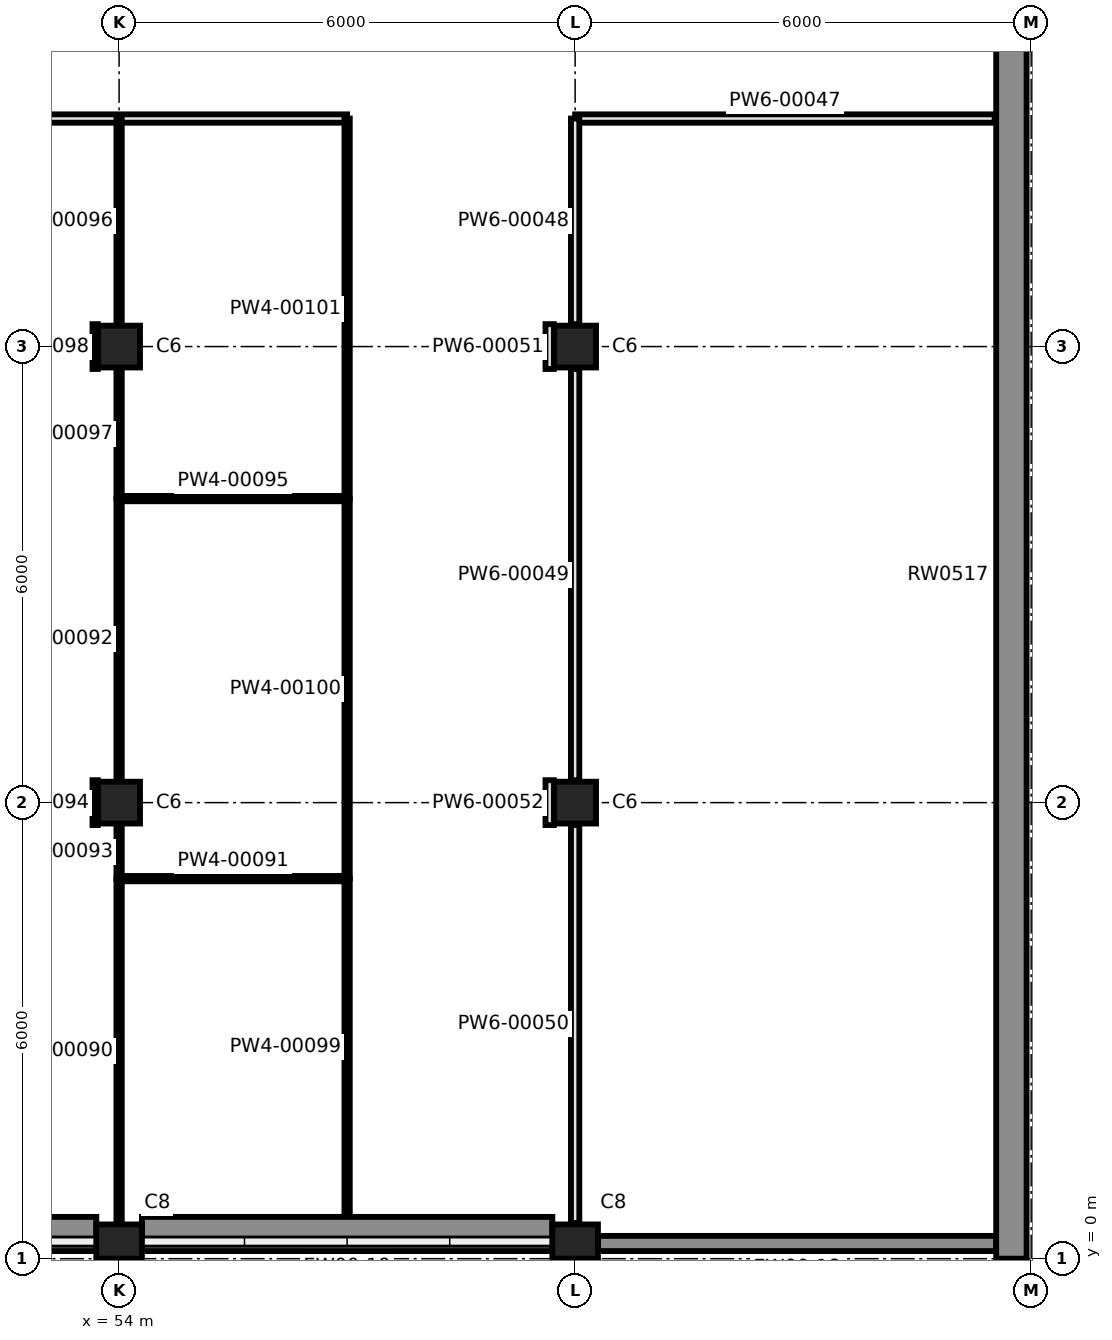
"""IFC4 building model, lengths in metres.
Left out: names, types, materials, properties, quantities, classifications, styles, units other than length and angle.
Written with IfcOpenShell. Run it as: python <this file> out.ifc"""

import sys

from ifc_helpers import new_model, si_unit, direction, frame, frame_2d, origin, origin_2d, place, context, subcontext, project, spatial, rectangle, extrude, element, fill, save


model = new_model("IFC4")
c1 = context("Model", 3, precision=1e-05, world=origin(), true_north=direction((0.0, 1.0)))
c2 = subcontext(c1, "Body", "Model", "MODEL_VIEW")
j1 = project(units=[si_unit("LENGTHUNIT", "METRE"), si_unit("PLANEANGLEUNIT", "RADIAN")], contexts=[c1])
p1 = place(None, origin())
s1 = spatial("IfcSite", under=j1, at=p1, CompositionType="ELEMENT")
p2 = place(p1, origin())
s2 = spatial("IfcBuilding", under=s1, at=p2, CompositionType="ELEMENT")
p3 = place(p2, origin())
s3 = spatial("IfcBuildingStorey", under=s2, at=p3, CompositionType="ELEMENT", Elevation=0.0)
for number, where, z_axis, x_axis in (
    (1, (54.0, 0.226, -0.3), (0.0, 0.0, 1.0), (1.0, 0.0, 0.0)),
    (2, (60.0, 0.226, -0.3), (0.0, 0.0, 1.0), (1.0, 0.0, 0.0)),
):
    element("IfcColumn", number, at=place(p3, frame(where, z_axis=z_axis, x_axis=x_axis)), inside=s3, PredefinedType="COLUMN", context=c2, shape_type="SweptSolid", body=[
        extrude(rectangle(XDim=0.6, YDim=0.45, at=origin_2d()), origin(), (0.0, 0.0, 1.0), 7.3),
    ])
for number, where, z_axis, x_axis in (
    (3, (54.0, 6.0, -0.3), (0.0, 0.0, 1.0), (1.0, 0.0, 0.0)),
    (4, (60.0, 6.0, -0.3), (0.0, 0.0, 1.0), (1.0, 0.0, 0.0)),
    (5, (54.0, 12.0, -0.3), (0.0, 0.0, 1.0), (1.0, 0.0, 0.0)),
    (6, (60.0, 12.0, -0.3), (0.0, 0.0, 1.0), (1.0, 0.0, 0.0)),
):
    element("IfcColumn", number, at=place(p3, frame(where, z_axis=z_axis, x_axis=x_axis)), inside=s3, PredefinedType="COLUMN", context=c2, shape_type="SweptSolid", body=[
        extrude(rectangle(XDim=0.55, YDim=0.55, at=origin_2d()), origin(), (0.0, 0.0, 1.0), 7.3),
    ])
p4 = place(p3, frame((65.74, 0.0, -0.3), z_axis=(0.0, 0.0, 1.0), x_axis=(0.0, 1.0, 0.0)))
e7 = element("IfcWall", 7, at=p4, inside=s3, PredefinedType="SOLIDWALL", context=c2, shape_type="SweptSolid", body=[
    extrude(rectangle(XDim=18.0, YDim=0.4, at=frame_2d((9.0, 0.0))), origin(), (0.0, 0.0, 1.0), 7.3),
])
p5 = place(p3, frame((65.54, 0.2, 0.0), z_axis=(0.0, 0.0, 1.0), x_axis=(-1.0, 0.0, 0.0)))
e8 = element("IfcWall", 8, at=p5, inside=s3, PredefinedType="SOLIDWALL", context=c2, shape_type="SweptSolid", body=[
    extrude(rectangle(XDim=5.24, YDim=0.2, at=frame_2d((2.62, 0.0))), origin(), (0.0, 0.0, 1.0), 6.75),
])
p6 = place(p5, frame((2.02, 0.0, 0.0)))
e9 = element("IfcOpeningElement", 9, at=p6, cuts=e8, PredefinedType="OPENING", context=c2, shape_type="SweptSolid", body=[
    extrude(rectangle(XDim=1.1, YDim=2.4, at=frame_2d((0.55, 1.2))), frame((0.0, 0.11, 0.0), z_axis=(0.0, -1.0, 0.0), x_axis=(1.0, 0.0, 0.0)), (0.0, 0.0, 1.0), 0.22),
])
p7 = place(p5, frame((2.02, 0.0, 2.5)))
e10 = element("IfcOpeningElement", 10, at=p7, cuts=e8, PredefinedType="OPENING", context=c2, shape_type="SweptSolid", body=[
    extrude(rectangle(XDim=1.1, YDim=3.9, at=frame_2d((0.55, 1.95))), frame((0.0, 0.11, 0.0), z_axis=(0.0, -1.0, 0.0), x_axis=(1.0, 0.0, 0.0)), (0.0, 0.0, 1.0), 0.22),
])
p8 = place(p5, frame((0.2, 0.0, 0.1)))
e11 = element("IfcOpeningElement", 11, at=p8, cuts=e8, PredefinedType="OPENING", context=c2, shape_type="SweptSolid", body=[
    extrude(rectangle(XDim=1.82, YDim=6.3, at=frame_2d((0.91, 3.15))), frame((0.0, 0.11, 0.0), z_axis=(0.0, -1.0, 0.0), x_axis=(1.0, 0.0, 0.0)), (0.0, 0.0, 1.0), 0.22),
])
p9 = place(p5, frame((3.12, 0.0, 0.1)))
e12 = element("IfcOpeningElement", 12, at=p9, cuts=e8, PredefinedType="OPENING", context=c2, shape_type="SweptSolid", body=[
    extrude(rectangle(XDim=1.92, YDim=6.3, at=frame_2d((0.96, 3.15))), frame((0.0, 0.11, 0.0), z_axis=(0.0, -1.0, 0.0), x_axis=(1.0, 0.0, 0.0)), (0.0, 0.0, 1.0), 0.22),
])
for number, where, z_axis, x_axis in (
    (13, (59.7, 0.325, 0.0), (0.0, 0.0, 1.0), (-1.0, 0.0, 0.0)),
    (14, (53.7, 0.325, 0.0), (0.0, 0.0, 1.0), (-1.0, 0.0, 0.0)),
):
    element("IfcWall", number, at=place(p3, frame(where, z_axis=z_axis, x_axis=x_axis)), inside=s3, PredefinedType="SOLIDWALL", context=c2, shape_type="SweptSolid", body=[
        extrude(rectangle(XDim=5.4, YDim=0.45, at=frame_2d((2.7, 0.0))), origin(), (0.0, 0.0, 1.0), 4.8),
    ])
p10 = place(p3, frame((42.0, 15.0, 0.0), z_axis=(0.0, 0.0, 1.0), x_axis=(1.0, 0.0, 0.0)))
e15 = element("IfcWall", 15, at=p10, inside=s3, PredefinedType="PARTITIONING", context=c2, shape_type="SweptSolid", body=[
    extrude(rectangle(XDim=15.0, YDim=0.11, at=frame_2d((7.5, 0.0))), origin(), (0.0, 0.0, 1.0), 6.15),
])
p11 = place(p10, frame((5.25, 0.0, 0.0)))
e16 = element("IfcOpeningElement", 16, at=p11, cuts=e15, PredefinedType="OPENING", context=c2, shape_type="SweptSolid", body=[
    extrude(rectangle(XDim=1.5, YDim=2.1, at=frame_2d((0.75, 1.05))), frame((0.0, 0.065, 0.0), z_axis=(0.0, -1.0, 0.0), x_axis=(1.0, 0.0, 0.0)), (0.0, 0.0, 1.0), 0.13),
])
p12 = place(p3, frame((60.0, 15.0, 0.0), z_axis=(0.0, 0.0, 1.0), x_axis=(1.0, 0.0, 0.0)))
e17 = element("IfcWall", 17, at=p12, inside=s3, PredefinedType="PARTITIONING", context=c2, shape_type="SweptSolid", body=[
    extrude(rectangle(XDim=5.52, YDim=0.11, at=frame_2d((2.76, 0.0))), origin(), (0.0, 0.0, 1.0), 6.15),
])
p13 = place(p3, frame((60.0, 12.295, 0.0), z_axis=(0.0, 0.0, 1.0), x_axis=(0.0, 1.0, 0.0)))
e18 = element("IfcWall", 18, at=p13, inside=s3, PredefinedType="PARTITIONING", context=c2, shape_type="SweptSolid", body=[
    extrude(rectangle(XDim=2.705, YDim=0.11, at=frame_2d((1.353, 0.0))), origin(), (0.0, 0.0, 1.0), 6.15),
])
p14 = place(p3, frame((60.0, 6.295, 0.0), z_axis=(0.0, 0.0, 1.0), x_axis=(0.0, 1.0, 0.0)))
e19 = element("IfcWall", 19, at=p14, inside=s3, PredefinedType="PARTITIONING", context=c2, shape_type="SweptSolid", body=[
    extrude(rectangle(XDim=5.41, YDim=0.11, at=frame_2d((2.705, 0.0))), origin(), (0.0, 0.0, 1.0), 6.15),
])
p15 = place(p14, frame((0.655, 0.0, 0.0)))
e20 = element("IfcOpeningElement", 20, at=p15, cuts=e19, PredefinedType="OPENING", context=c2, shape_type="SweptSolid", body=[
    extrude(rectangle(XDim=1.0, YDim=2.1, at=frame_2d((0.5, 1.05))), frame((0.0, 0.065, 0.0), z_axis=(0.0, -1.0, 0.0), x_axis=(1.0, 0.0, 0.0)), (0.0, 0.0, 1.0), 0.13),
])
p16 = place(p3, frame((60.0, 0.47, 0.0), z_axis=(0.0, 0.0, 1.0), x_axis=(0.0, 1.0, 0.0)))
e21 = element("IfcWall", 21, at=p16, inside=s3, PredefinedType="PARTITIONING", context=c2, shape_type="SweptSolid", body=[
    extrude(rectangle(XDim=5.235, YDim=0.11, at=frame_2d((2.617, 0.0))), origin(), (0.0, 0.0, 1.0), 6.15),
])
for number, where, z_axis, x_axis in (
    (22, (59.665, 11.705, 0.0), (0.0, 0.0, 1.0), (0.0, 1.0, 0.0)),
    (23, (59.665, 5.705, 0.0), (0.0, 0.0, 1.0), (0.0, 1.0, 0.0)),
):
    element("IfcWall", number, at=place(p3, frame(where, z_axis=z_axis, x_axis=x_axis)), inside=s3, PredefinedType="PARTITIONING", context=c2, shape_type="SweptSolid", body=[
        extrude(rectangle(XDim=0.59, YDim=0.11, at=frame_2d((0.295, 0.0))), origin(), (0.0, 0.0, 1.0), 6.15),
    ])
p17 = place(p3, frame((54.0, 0.47, 0.0), z_axis=(0.0, 0.0, 1.0), x_axis=(0.0, 1.0, 0.0)))
e24 = element("IfcWall", 24, at=p17, inside=s3, PredefinedType="PARTITIONING", context=c2, shape_type="SweptSolid", body=[
    extrude(rectangle(XDim=4.53, YDim=0.07, at=frame_2d((2.265, 0.0))), origin(), (0.0, 0.0, 1.0), 6.15),
])
p18 = place(p3, frame((54.0, 5.0, 0.0), z_axis=(0.0, 0.0, 1.0), x_axis=(1.0, 0.0, 0.0)))
e25 = element("IfcWall", 25, at=p18, inside=s3, PredefinedType="PARTITIONING", context=c2, shape_type="SweptSolid", body=[
    extrude(rectangle(XDim=3.0, YDim=0.07, at=frame_2d((1.5, 0.0))), origin(), (0.0, 0.0, 1.0), 6.15),
])
p19 = place(p3, frame((54.0, 6.295, 0.0), z_axis=(0.0, 0.0, 1.0), x_axis=(0.0, 1.0, 0.0)))
e26 = element("IfcWall", 26, at=p19, inside=s3, PredefinedType="PARTITIONING", context=c2, shape_type="SweptSolid", body=[
    extrude(rectangle(XDim=3.705, YDim=0.07, at=frame_2d((1.853, 0.0))), origin(), (0.0, 0.0, 1.0), 6.15),
])
p20 = place(p3, frame((54.0, 5.0, 0.0), z_axis=(0.0, 0.0, 1.0), x_axis=(0.0, 1.0, 0.0)))
e27 = element("IfcWall", 27, at=p20, inside=s3, PredefinedType="PARTITIONING", context=c2, shape_type="SweptSolid", body=[
    extrude(rectangle(XDim=0.705, YDim=0.07, at=frame_2d((0.353, 0.0))), origin(), (0.0, 0.0, 1.0), 6.15),
])
p21 = place(p3, frame((53.685, 5.705, 0.0), z_axis=(0.0, 0.0, 1.0), x_axis=(0.0, 1.0, 0.0)))
e28 = element("IfcWall", 28, at=p21, inside=s3, PredefinedType="PARTITIONING", context=c2, shape_type="SweptSolid", body=[
    extrude(rectangle(XDim=0.59, YDim=0.07, at=frame_2d((0.295, 0.0))), origin(), (0.0, 0.0, 1.0), 6.15),
])
p22 = place(p3, frame((54.0, 10.0, 0.0), z_axis=(0.0, 0.0, 1.0), x_axis=(1.0, 0.0, 0.0)))
e29 = element("IfcWall", 29, at=p22, inside=s3, PredefinedType="PARTITIONING", context=c2, shape_type="SweptSolid", body=[
    extrude(rectangle(XDim=3.0, YDim=0.07, at=frame_2d((1.5, 0.0))), origin(), (0.0, 0.0, 1.0), 6.15),
])
p23 = place(p3, frame((54.0, 12.295, 0.0), z_axis=(0.0, 0.0, 1.0), x_axis=(0.0, 1.0, 0.0)))
e30 = element("IfcWall", 30, at=p23, inside=s3, PredefinedType="PARTITIONING", context=c2, shape_type="SweptSolid", body=[
    extrude(rectangle(XDim=2.705, YDim=0.07, at=frame_2d((1.353, 0.0))), origin(), (0.0, 0.0, 1.0), 6.15),
])
p24 = place(p3, frame((54.0, 10.0, 0.0), z_axis=(0.0, 0.0, 1.0), x_axis=(0.0, 1.0, 0.0)))
e31 = element("IfcWall", 31, at=p24, inside=s3, PredefinedType="PARTITIONING", context=c2, shape_type="SweptSolid", body=[
    extrude(rectangle(XDim=1.705, YDim=0.07, at=frame_2d((0.853, 0.0))), origin(), (0.0, 0.0, 1.0), 6.15),
])
p25 = place(p3, frame((53.685, 11.705, 0.0), z_axis=(0.0, 0.0, 1.0), x_axis=(0.0, 1.0, 0.0)))
e32 = element("IfcWall", 32, at=p25, inside=s3, PredefinedType="PARTITIONING", context=c2, shape_type="SweptSolid", body=[
    extrude(rectangle(XDim=0.59, YDim=0.07, at=frame_2d((0.295, 0.0))), origin(), (0.0, 0.0, 1.0), 6.15),
])
p26 = place(p3, frame((57.0, 0.57, 0.0), z_axis=(0.0, 0.0, 1.0), x_axis=(0.0, 1.0, 0.0)))
e33 = element("IfcWall", 33, at=p26, inside=s3, PredefinedType="PARTITIONING", context=c2, shape_type="SweptSolid", body=[
    extrude(rectangle(XDim=4.43, YDim=0.07, at=frame_2d((2.215, 0.0))), origin(), (0.0, 0.0, 1.0), 6.3),
])
p27 = place(p26, frame((1.48, 0.0, 0.0)))
e34 = element("IfcOpeningElement", 34, at=p27, cuts=e33, PredefinedType="OPENING", context=c2, shape_type="SweptSolid", body=[
    extrude(rectangle(XDim=0.92, YDim=2.04, at=frame_2d((0.46, 1.02))), frame((0.0, 0.045, 0.0), z_axis=(0.0, -1.0, 0.0), x_axis=(1.0, 0.0, 0.0)), (0.0, 0.0, 1.0), 0.09),
])
p28 = place(p3, frame((57.0, 5.0, 0.0), z_axis=(0.0, 0.0, 1.0), x_axis=(0.0, 1.0, 0.0)))
e35 = element("IfcWall", 35, at=p28, inside=s3, PredefinedType="PARTITIONING", context=c2, shape_type="SweptSolid", body=[
    extrude(rectangle(XDim=5.0, YDim=0.07, at=frame_2d((2.5, 0.0))), origin(), (0.0, 0.0, 1.0), 6.15),
])
p29 = place(p28, frame((2.05, 0.0, 0.0)))
e36 = element("IfcOpeningElement", 36, at=p29, cuts=e35, PredefinedType="OPENING", context=c2, shape_type="SweptSolid", body=[
    extrude(rectangle(XDim=0.92, YDim=2.04, at=frame_2d((0.46, 1.02))), frame((0.0, 0.045, 0.0), z_axis=(0.0, -1.0, 0.0), x_axis=(1.0, 0.0, 0.0)), (0.0, 0.0, 1.0), 0.09),
])
p30 = place(p3, frame((57.0, 10.0, 0.0), z_axis=(0.0, 0.0, 1.0), x_axis=(0.0, 1.0, 0.0)))
e37 = element("IfcWall", 37, at=p30, inside=s3, PredefinedType="PARTITIONING", context=c2, shape_type="SweptSolid", body=[
    extrude(rectangle(XDim=5.0, YDim=0.07, at=frame_2d((2.5, 0.0))), origin(), (0.0, 0.0, 1.0), 6.15),
])
p31 = place(p30, frame((2.05, 0.0, 0.0)))
e38 = element("IfcOpeningElement", 38, at=p31, cuts=e37, PredefinedType="OPENING", context=c2, shape_type="SweptSolid", body=[
    extrude(rectangle(XDim=0.92, YDim=2.04, at=frame_2d((0.46, 1.02))), frame((0.0, 0.045, 0.0), z_axis=(0.0, -1.0, 0.0), x_axis=(1.0, 0.0, 0.0)), (0.0, 0.0, 1.0), 0.09),
])
p32 = place(p6, origin())
e39 = element("IfcDoor", 39, at=p32, inside=s3, OperationType="SINGLE_SWING_RIGHT", PredefinedType="DOOR", context=c2, shape_type="SweptSolid", body=[
    extrude(rectangle(XDim=1.1, YDim=2.4, at=frame_2d((0.55, 1.2))), frame((0.0, 0.025, 0.0), z_axis=(0.0, -1.0, 0.0), x_axis=(1.0, 0.0, 0.0)), (0.0, 0.0, 1.0), 0.05),
])
fill(e9, e39)
p33 = place(p7, origin())
e40 = element("IfcWindow", 40, at=p33, inside=s3, PartitioningType="SINGLE_PANEL", PredefinedType="WINDOW", context=c2, shape_type="SweptSolid", body=[
    extrude(rectangle(XDim=1.1, YDim=3.9, at=frame_2d((0.55, 1.95))), frame((0.0, 0.03, 0.0), z_axis=(0.0, -1.0, 0.0), x_axis=(1.0, 0.0, 0.0)), (0.0, 0.0, 1.0), 0.06),
])
fill(e10, e40)
p34 = place(p8, origin())
e41 = element("IfcWindow", 41, at=p34, inside=s3, PartitioningType="SINGLE_PANEL", PredefinedType="WINDOW", context=c2, shape_type="SweptSolid", body=[
    extrude(rectangle(XDim=1.82, YDim=6.3, at=frame_2d((0.91, 3.15))), frame((0.0, 0.03, 0.0), z_axis=(0.0, -1.0, 0.0), x_axis=(1.0, 0.0, 0.0)), (0.0, 0.0, 1.0), 0.06),
])
fill(e11, e41)
p35 = place(p9, origin())
e42 = element("IfcWindow", 42, at=p35, inside=s3, PartitioningType="SINGLE_PANEL", PredefinedType="WINDOW", context=c2, shape_type="SweptSolid", body=[
    extrude(rectangle(XDim=1.92, YDim=6.3, at=frame_2d((0.96, 3.15))), frame((0.0, 0.03, 0.0), z_axis=(0.0, -1.0, 0.0), x_axis=(1.0, 0.0, 0.0)), (0.0, 0.0, 1.0), 0.06),
])
fill(e12, e42)
p36 = place(p27, origin())
e43 = element("IfcDoor", 43, at=p36, inside=s3, OperationType="SINGLE_SWING_RIGHT", PredefinedType="DOOR", context=c2, shape_type="SweptSolid", body=[
    extrude(rectangle(XDim=0.92, YDim=2.04, at=frame_2d((0.46, 1.02))), frame((0.0, 0.025, 0.0), z_axis=(0.0, -1.0, 0.0), x_axis=(1.0, 0.0, 0.0)), (0.0, 0.0, 1.0), 0.05),
])
fill(e34, e43)
p37 = place(p29, origin())
e44 = element("IfcDoor", 44, at=p37, inside=s3, OperationType="SINGLE_SWING_RIGHT", PredefinedType="DOOR", context=c2, shape_type="SweptSolid", body=[
    extrude(rectangle(XDim=0.92, YDim=2.04, at=frame_2d((0.46, 1.02))), frame((0.0, 0.025, 0.0), z_axis=(0.0, -1.0, 0.0), x_axis=(1.0, 0.0, 0.0)), (0.0, 0.0, 1.0), 0.05),
])
fill(e36, e44)
p38 = place(p31, origin())
e45 = element("IfcDoor", 45, at=p38, inside=s3, OperationType="SINGLE_SWING_RIGHT", PredefinedType="DOOR", context=c2, shape_type="SweptSolid", body=[
    extrude(rectangle(XDim=0.92, YDim=2.04, at=frame_2d((0.46, 1.02))), frame((0.0, 0.025, 0.0), z_axis=(0.0, -1.0, 0.0), x_axis=(1.0, 0.0, 0.0)), (0.0, 0.0, 1.0), 0.05),
])
fill(e38, e45)
p39 = place(p15, frame((1.0, 0.0, 0.0), z_axis=(0.0, 0.0, 1.0), x_axis=(-1.0, 0.0, 0.0)))
e46 = element("IfcDoor", 46, at=p39, inside=s3, OperationType="SINGLE_SWING_LEFT", PredefinedType="DOOR", context=c2, shape_type="SweptSolid", body=[
    extrude(rectangle(XDim=1.0, YDim=2.1, at=frame_2d((0.5, 1.05))), frame((0.0, 0.025, 0.0), z_axis=(0.0, -1.0, 0.0), x_axis=(1.0, 0.0, 0.0)), (0.0, 0.0, 1.0), 0.05),
])
fill(e20, e46)
save(model, sys.argv[1])
